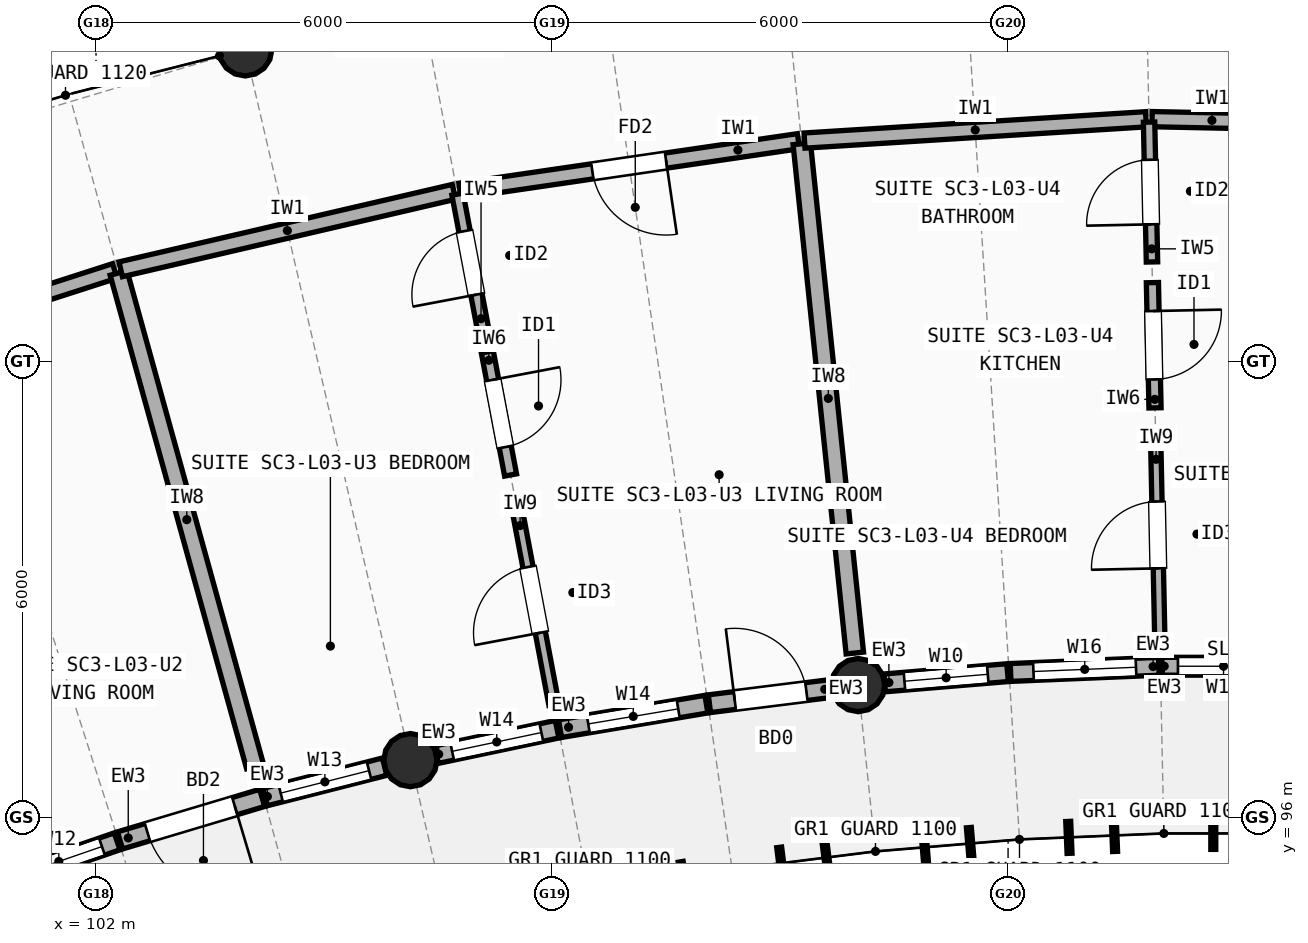
"""IFC4 building model, lengths in metres.
Left out: names, types, materials, properties, quantities, classifications, styles, units other than length and angle.
Written with IfcOpenShell. Run it as: python <this file> out.ifc"""

import sys

from ifc_helpers import new_model, si_unit, direction, frame, frame_2d, origin, origin_2d, place, context, subcontext, project, spatial, rectangle, circle, extrude, element, fill, save


model = new_model("IFC4")
c1 = context("Model", 3, precision=1e-05, world=origin(), true_north=direction((0.0, 1.0)))
c2 = subcontext(c1, "Body", "Model", "MODEL_VIEW")
j1 = project(units=[si_unit("LENGTHUNIT", "METRE"), si_unit("PLANEANGLEUNIT", "RADIAN")], contexts=[c1])
p1 = place(None, origin())
s1 = spatial("IfcSite", under=j1, at=p1, CompositionType="ELEMENT")
p2 = place(p1, origin())
s2 = spatial("IfcBuilding", under=s1, at=p2, CompositionType="ELEMENT")
p3 = place(p2, frame((0.0, 0.0, 10.9)))
s3 = spatial("IfcBuildingStorey", under=s2, at=p3, CompositionType="ELEMENT", Elevation=10.9)
for number, where, z_axis, x_axis in (
    (1, (106.136, 96.754, 0.0), (0.0, 0.0, 1.0), (1.0, 0.0, 0.0)),
    (2, (103.963, 106.105, 0.0), (0.0, 0.0, 1.0), (1.0, 0.0, 0.0)),
    (3, (112.028, 97.742, 0.0), (0.0, 0.0, 1.0), (1.0, 0.0, 0.0)),
):
    element("IfcColumn", number, at=place(p3, frame(where, z_axis=z_axis, x_axis=x_axis)), inside=s3, PredefinedType="COLUMN", context=c2, shape_type="SweptSolid", body=[
        extrude(circle(Radius=0.35, at=origin_2d()), origin(), (0.0, 0.0, 1.0), 2.948),
    ])
p4 = place(p3, frame((100.744, 95.157, 0.0), z_axis=(0.0, 0.0, 1.0), x_axis=(0.945336194352, 0.32609734689, 0.0)))
e4 = element("IfcWall", 4, at=p4, inside=s3, PredefinedType="STANDARD", context=c2, shape_type="SweptSolid", body=[
    extrude(rectangle(XDim=1.622, YDim=0.235, at=frame_2d((0.811, 0.0))), origin(), (0.0, 0.0, 1.0), 2.684),
])
p5 = place(p4, frame((0.211, 0.0, 0.85)))
e5 = element("IfcOpeningElement", 5, at=p5, cuts=e4, PredefinedType="OPENING", context=c2, shape_type="SweptSolid", body=[
    extrude(rectangle(XDim=1.2, YDim=1.35, at=frame_2d((0.6, 0.675))), frame((0.0, 0.127, 0.0), z_axis=(0.0, -1.0, 0.0), x_axis=(1.0, 0.0, 0.0)), (0.0, 0.0, 1.0), 0.255),
])
p6 = place(p3, frame((102.316, 95.698, 0.0), z_axis=(0.0, 0.0, 1.0), x_axis=(0.95807718441, 0.286510224446, 0.0)))
e6 = element("IfcWall", 6, at=p6, inside=s3, PredefinedType="STANDARD", context=c2, shape_type="SweptSolid", body=[
    extrude(rectangle(XDim=1.952, YDim=0.235, at=frame_2d((0.976, 0.0))), origin(), (0.0, 0.0, 1.0), 2.684),
])
p7 = place(p6, frame((0.376, 0.0, 0.0)))
e7 = element("IfcOpeningElement", 7, at=p7, cuts=e6, PredefinedType="OPENING", context=c2, shape_type="SweptSolid", body=[
    extrude(rectangle(XDim=1.2, YDim=2.15, at=frame_2d((0.6, 1.075))), frame((0.0, 0.127, 0.0), z_axis=(0.0, -1.0, 0.0), x_axis=(1.0, 0.0, 0.0)), (0.0, 0.0, 1.0), 0.255),
])
p8 = place(p3, frame((104.225, 96.268, 0.0), z_axis=(0.0, 0.0, 1.0), x_axis=(0.969152085663, 0.246463455413, 0.0)))
e8 = element("IfcWall", 8, at=p8, inside=s3, PredefinedType="STANDARD", context=c2, shape_type="SweptSolid", body=[
    extrude(rectangle(XDim=1.623, YDim=0.235, at=frame_2d((0.811, 0.0))), origin(), (0.0, 0.0, 1.0), 2.684),
])
p9 = place(p8, frame((0.211, 0.0, 0.85)))
e9 = element("IfcOpeningElement", 9, at=p9, cuts=e8, PredefinedType="OPENING", context=c2, shape_type="SweptSolid", body=[
    extrude(rectangle(XDim=1.2, YDim=1.45, at=frame_2d((0.6, 0.725))), frame((0.0, 0.127, 0.0), z_axis=(0.0, -1.0, 0.0), x_axis=(1.0, 0.0, 0.0)), (0.0, 0.0, 1.0), 0.255),
])
p10 = place(p3, frame((106.479, 96.826, 0.0), z_axis=(0.0, 0.0, 1.0), x_axis=(0.978514642092, 0.206177339229, 0.0)))
e10 = element("IfcWall", 10, at=p10, inside=s3, PredefinedType="STANDARD", context=c2, shape_type="SweptSolid", body=[
    extrude(rectangle(XDim=1.622, YDim=0.235, at=frame_2d((0.811, 0.0))), origin(), (0.0, 0.0, 1.0), 2.684),
])
p11 = place(p10, frame((0.211, 0.0, 0.85)))
e11 = element("IfcOpeningElement", 11, at=p11, cuts=e10, PredefinedType="OPENING", context=c2, shape_type="SweptSolid", body=[
    extrude(rectangle(XDim=1.2, YDim=1.5, at=frame_2d((0.6, 0.75))), frame((0.0, 0.127, 0.0), z_axis=(0.0, -1.0, 0.0), x_axis=(1.0, 0.0, 0.0)), (0.0, 0.0, 1.0), 0.255),
])
p12 = place(p3, frame((108.105, 97.168, 0.0), z_axis=(0.0, 0.0, 1.0), x_axis=(0.986241418229, 0.165311418144, 0.0)))
e12 = element("IfcWall", 12, at=p12, inside=s3, PredefinedType="STANDARD", context=c2, shape_type="SweptSolid", body=[
    extrude(rectangle(XDim=1.952, YDim=0.235, at=frame_2d((0.976, 0.0))), origin(), (0.0, 0.0, 1.0), 2.684),
])
p13 = place(p12, frame((0.376, 0.0, 0.85)))
e13 = element("IfcOpeningElement", 13, at=p13, cuts=e12, PredefinedType="OPENING", context=c2, shape_type="SweptSolid", body=[
    extrude(rectangle(XDim=1.2, YDim=1.5, at=frame_2d((0.6, 0.75))), frame((0.0, 0.127, 0.0), z_axis=(0.0, -1.0, 0.0), x_axis=(1.0, 0.0, 0.0)), (0.0, 0.0, 1.0), 0.255),
])
p14 = place(p3, frame((110.071, 97.497, 0.0), z_axis=(0.0, 0.0, 1.0), x_axis=(0.992263980046, 0.124145857376, 0.0)))
e14 = element("IfcWall", 14, at=p14, inside=s3, PredefinedType="STANDARD", context=c2, shape_type="SweptSolid", body=[
    extrude(rectangle(XDim=1.622, YDim=0.235, at=frame_2d((0.811, 0.0))), origin(), (0.0, 0.0, 1.0), 2.684),
])
p15 = place(p14, frame((0.336, 0.0, 0.0)))
e15 = element("IfcOpeningElement", 15, at=p15, cuts=e14, PredefinedType="OPENING", context=c2, shape_type="SweptSolid", body=[
    extrude(rectangle(XDim=0.95, YDim=2.12, at=frame_2d((0.475, 1.06))), frame((0.0, 0.127, 0.0), z_axis=(0.0, -1.0, 0.0), x_axis=(1.0, 0.0, 0.0)), (0.0, 0.0, 1.0), 0.255),
])
p16 = place(p3, frame((112.376, 97.771, 0.0), z_axis=(0.0, 0.0, 1.0), x_axis=(0.996557163732, 0.082908500259, 0.0)))
e16 = element("IfcWall", 16, at=p16, inside=s3, PredefinedType="STANDARD", context=c2, shape_type="SweptSolid", body=[
    extrude(rectangle(XDim=1.623, YDim=0.235, at=frame_2d((0.811, 0.0))), origin(), (0.0, 0.0, 1.0), 2.684),
])
p17 = place(p16, frame((0.261, 0.0, 0.85)))
e17 = element("IfcOpeningElement", 17, at=p17, cuts=e16, PredefinedType="OPENING", context=c2, shape_type="SweptSolid", body=[
    extrude(rectangle(XDim=1.1, YDim=1.45, at=frame_2d((0.55, 0.725))), frame((0.0, 0.127, 0.0), z_axis=(0.0, -1.0, 0.0), x_axis=(1.0, 0.0, 0.0)), (0.0, 0.0, 1.0), 0.255),
])
p18 = place(p3, frame((114.033, 97.908, 0.0), z_axis=(0.0, 0.0, 1.0), x_axis=(0.999132639597, 0.041640947307, 0.0)))
e18 = element("IfcWall", 18, at=p18, inside=s3, PredefinedType="STANDARD", context=c2, shape_type="SweptSolid", body=[
    extrude(rectangle(XDim=1.952, YDim=0.235, at=frame_2d((0.976, 0.0))), origin(), (0.0, 0.0, 1.0), 2.684),
])
p19 = place(p18, frame((0.301, 0.0, 0.85)))
e19 = element("IfcOpeningElement", 19, at=p19, cuts=e18, PredefinedType="OPENING", context=c2, shape_type="SweptSolid", body=[
    extrude(rectangle(XDim=1.35, YDim=1.5, at=frame_2d((0.675, 0.75))), frame((0.0, 0.127, 0.0), z_axis=(0.0, -1.0, 0.0), x_axis=(1.0, 0.0, 0.0)), (0.0, 0.0, 1.0), 0.255),
])
p20 = place(p3, frame((116.024, 97.99, 0.0), z_axis=(0.0, 0.0, 1.0), x_axis=(1.0, 0.0, 0.0)))
e20 = element("IfcWall", 20, at=p20, inside=s3, PredefinedType="STANDARD", context=c2, shape_type="SweptSolid", body=[
    extrude(rectangle(XDim=1.623, YDim=0.235, at=frame_2d((0.811, 0.0))), origin(), (0.0, 0.0, 1.0), 2.684),
])
p21 = place(p20, frame((0.211, 0.0, 0.85)))
e21 = element("IfcOpeningElement", 21, at=p21, cuts=e20, PredefinedType="OPENING", context=c2, shape_type="SweptSolid", body=[
    extrude(rectangle(XDim=1.2, YDim=1.35, at=frame_2d((0.6, 0.675))), frame((0.0, 0.127, 0.0), z_axis=(0.0, -1.0, 0.0), x_axis=(1.0, 0.0, 0.0)), (0.0, 0.0, 1.0), 0.255),
])
p22 = place(p3, frame((97.963, 101.812, 0.0), z_axis=(0.0, 0.0, 1.0), x_axis=(0.95193992138, 0.306284812035, 0.0)))
e22 = element("IfcWall", 22, at=p22, inside=s3, PredefinedType="SOLIDWALL", context=c2, shape_type="SweptSolid", body=[
    extrude(rectangle(XDim=4.501, YDim=0.2, at=frame_2d((2.25, 0.0))), origin(), (0.0, 0.0, 1.0), 2.722),
])
p23 = place(p22, frame((1.751, 0.0, 0.0)))
e23 = element("IfcOpeningElement", 23, at=p23, cuts=e22, PredefinedType="OPENING", context=c2, shape_type="SweptSolid", body=[
    extrude(rectangle(XDim=1.0, YDim=2.15, at=frame_2d((0.5, 1.075))), frame((0.0, 0.11, 0.0), z_axis=(0.0, -1.0, 0.0), x_axis=(1.0, 0.0, 0.0)), (0.0, 0.0, 1.0), 0.22),
])
p24 = place(p3, frame((104.092, 96.672, 0.0), z_axis=(0.0, 0.0, 1.0), x_axis=(-0.266578174631, 0.963813299768, 0.0)))
e24 = element("IfcWall", 24, at=p24, inside=s3, PredefinedType="SOLIDWALL", context=c2, shape_type="SweptSolid", body=[
    extrude(rectangle(XDim=6.736, YDim=0.23, at=frame_2d((3.368, 0.0))), origin(), (0.0, 0.0, 1.0), 2.742),
])
p25 = place(p3, frame((102.325, 103.212, 0.0), z_axis=(0.0, 0.0, 1.0), x_axis=(0.974052809246, 0.226320844821, 0.0)))
e25 = element("IfcWall", 25, at=p25, inside=s3, PredefinedType="SOLIDWALL", context=c2, shape_type="SweptSolid", body=[
    extrude(rectangle(XDim=4.501, YDim=0.2, at=frame_2d((2.251, 0.0))), origin(), (0.0, 0.0, 1.0), 2.762),
])
p26 = place(p3, frame((106.788, 104.246, 0.0), z_axis=(0.0, 0.0, 1.0), x_axis=(0.98946769641, 0.14475385232, 0.0)))
e26 = element("IfcWall", 26, at=p26, inside=s3, PredefinedType="SOLIDWALL", context=c2, shape_type="SweptSolid", body=[
    extrude(rectangle(XDim=4.501, YDim=0.2, at=frame_2d((2.251, 0.0))), origin(), (0.0, 0.0, 1.0), 2.742),
])
p27 = place(p26, frame((1.761, 0.0, 0.0)))
e27 = element("IfcOpeningElement", 27, at=p27, cuts=e26, PredefinedType="OPENING", context=c2, shape_type="SweptSolid", body=[
    extrude(rectangle(XDim=0.98, YDim=2.15, at=frame_2d((0.49, 1.075))), frame((0.0, 0.11, 0.0), z_axis=(0.0, -1.0, 0.0), x_axis=(1.0, 0.0, 0.0)), (0.0, 0.0, 1.0), 0.22),
])
p28 = place(p3, frame((108.025, 97.487, 0.0), z_axis=(0.0, 0.0, 1.0), x_axis=(-0.185725576604, 0.982601653874, 0.0)))
e28 = element("IfcWall", 28, at=p28, inside=s3, PredefinedType="PARTITIONING", context=c2, shape_type="SweptSolid", body=[
    extrude(rectangle(XDim=2.8, YDim=0.135, at=frame_2d((1.4, 0.0))), origin(), (0.0, 0.0, 1.0), 2.722),
])
p29 = place(p28, frame((0.96, 0.0, 0.0)))
e29 = element("IfcOpeningElement", 29, at=p29, cuts=e28, PredefinedType="OPENING", context=c2, shape_type="SweptSolid", body=[
    extrude(rectangle(XDim=0.88, YDim=2.1, at=frame_2d((0.44, 1.05))), frame((0.0, 0.077, 0.0), z_axis=(0.0, -1.0, 0.0), x_axis=(1.0, 0.0, 0.0)), (0.0, 0.0, 1.0), 0.155),
])
p30 = place(p3, frame((107.454, 100.506, 0.0), z_axis=(0.0, 0.0, 1.0), x_axis=(-0.185764109712, 0.98259436979, 0.0)))
e30 = element("IfcWall", 30, at=p30, inside=s3, PredefinedType="PLUMBINGWALL", context=c2, shape_type="SweptSolid", body=[
    extrude(rectangle(XDim=1.648, YDim=0.16, at=frame_2d((0.824, 0.0))), origin(), (0.0, 0.0, 1.0), 2.722),
])
p31 = place(p30, frame((0.374, 0.0, 0.0)))
e31 = element("IfcOpeningElement", 31, at=p31, cuts=e30, PredefinedType="OPENING", context=c2, shape_type="SweptSolid", body=[
    extrude(rectangle(XDim=0.9, YDim=2.1, at=frame_2d((0.45, 1.05))), frame((0.0, 0.09, 0.0), z_axis=(0.0, -1.0, 0.0), x_axis=(1.0, 0.0, 0.0)), (0.0, 0.0, 1.0), 0.18),
])
p32 = place(p3, frame((107.098, 102.392, 0.0), z_axis=(0.0, 0.0, 1.0), x_axis=(-0.185746265255, 0.982597743201, 0.0)))
e32 = element("IfcWall", 32, at=p32, inside=s3, PredefinedType="PARTITIONING", context=c2, shape_type="SweptSolid", body=[
    extrude(rectangle(XDim=1.84, YDim=0.15, at=frame_2d((0.92, 0.0))), origin(), (0.0, 0.0, 1.0), 2.722),
])
p33 = place(p32, frame((0.495, 0.0, 0.0)))
e33 = element("IfcOpeningElement", 33, at=p33, cuts=e32, PredefinedType="OPENING", context=c2, shape_type="SweptSolid", body=[
    extrude(rectangle(XDim=0.85, YDim=2.1, at=frame_2d((0.425, 1.05))), frame((0.0, 0.085, 0.0), z_axis=(0.0, -1.0, 0.0), x_axis=(1.0, 0.0, 0.0)), (0.0, 0.0, 1.0), 0.17),
])
p34 = place(p3, frame((111.984, 98.164, 0.0), z_axis=(0.0, 0.0, 1.0), x_axis=(-0.10362251791, 0.994616696915, 0.0)))
e34 = element("IfcWall", 34, at=p34, inside=s3, PredefinedType="SOLIDWALL", context=c2, shape_type="SweptSolid", body=[
    extrude(rectangle(XDim=6.736, YDim=0.23, at=frame_2d((3.368, 0.0))), origin(), (0.0, 0.0, 1.0), 2.762),
])
p35 = place(p3, frame((111.322, 104.906, 0.0), z_axis=(0.0, 0.0, 1.0), x_axis=(0.998063116084, 0.062209455176, 0.0)))
e35 = element("IfcWall", 35, at=p35, inside=s3, PredefinedType="SOLIDWALL", context=c2, shape_type="SweptSolid", body=[
    extrude(rectangle(XDim=4.501, YDim=0.2, at=frame_2d((2.251, 0.0))), origin(), (0.0, 0.0, 1.0), 2.722),
])
p36 = place(p3, frame((115.894, 105.187, 0.0), z_axis=(0.0, 0.0, 1.0), x_axis=(0.999785356511, -0.020718129879, 0.0)))
e36 = element("IfcWall", 36, at=p36, inside=s3, PredefinedType="SOLIDWALL", context=c2, shape_type="SweptSolid", body=[
    extrude(rectangle(XDim=4.501, YDim=0.2, at=frame_2d((2.251, 0.0))), origin(), (0.0, 0.0, 1.0), 2.762),
])
p37 = place(p36, frame((1.726, 0.0, 0.0)))
e37 = element("IfcOpeningElement", 37, at=p37, cuts=e36, PredefinedType="OPENING", context=c2, shape_type="SweptSolid", body=[
    extrude(rectangle(XDim=1.05, YDim=2.15, at=frame_2d((0.525, 1.075))), frame((0.0, 0.11, 0.0), z_axis=(0.0, -1.0, 0.0), x_axis=(1.0, 0.0, 0.0)), (0.0, 0.0, 1.0), 0.22),
])
p38 = place(p3, frame((115.997, 98.318, 0.0), z_axis=(0.0, 0.0, 1.0), x_axis=(-0.02075255058, 0.999784642633, 0.0)))
e38 = element("IfcWall", 38, at=p38, inside=s3, PredefinedType="PARTITIONING", context=c2, shape_type="SweptSolid", body=[
    extrude(rectangle(XDim=2.8, YDim=0.135, at=frame_2d((1.4, 0.0))), origin(), (0.0, 0.0, 1.0), 2.742),
])
p39 = place(p38, frame((0.96, 0.0, 0.0)))
e39 = element("IfcOpeningElement", 39, at=p39, cuts=e38, PredefinedType="OPENING", context=c2, shape_type="SweptSolid", body=[
    extrude(rectangle(XDim=0.88, YDim=2.1, at=frame_2d((0.44, 1.05))), frame((0.0, 0.077, 0.0), z_axis=(0.0, -1.0, 0.0), x_axis=(1.0, 0.0, 0.0)), (0.0, 0.0, 1.0), 0.155),
])
p40 = place(p3, frame((115.933, 101.389, 0.0), z_axis=(0.0, 0.0, 1.0), x_axis=(-0.020887426075, 0.999781833918, 0.0)))
e40 = element("IfcWall", 40, at=p40, inside=s3, PredefinedType="PLUMBINGWALL", context=c2, shape_type="SweptSolid", body=[
    extrude(rectangle(XDim=1.648, YDim=0.16, at=frame_2d((0.824, 0.0))), origin(), (0.0, 0.0, 1.0), 2.742),
])
p41 = place(p40, frame((0.374, 0.0, 0.0)))
e41 = element("IfcOpeningElement", 41, at=p41, cuts=e40, PredefinedType="OPENING", context=c2, shape_type="SweptSolid", body=[
    extrude(rectangle(XDim=0.9, YDim=2.1, at=frame_2d((0.45, 1.05))), frame((0.0, 0.09, 0.0), z_axis=(0.0, -1.0, 0.0), x_axis=(1.0, 0.0, 0.0)), (0.0, 0.0, 1.0), 0.18),
])
p42 = place(p3, frame((115.893, 103.309, 0.0), z_axis=(0.0, 0.0, 1.0), x_axis=(-0.020698948586, 0.999785753813, 0.0)))
e42 = element("IfcWall", 42, at=p42, inside=s3, PredefinedType="PARTITIONING", context=c2, shape_type="SweptSolid", body=[
    extrude(rectangle(XDim=1.84, YDim=0.15, at=frame_2d((0.92, 0.0))), origin(), (0.0, 0.0, 1.0), 2.742),
])
p43 = place(p42, frame((0.495, 0.0, 0.0)))
e43 = element("IfcOpeningElement", 43, at=p43, cuts=e42, PredefinedType="OPENING", context=c2, shape_type="SweptSolid", body=[
    extrude(rectangle(XDim=0.85, YDim=2.1, at=frame_2d((0.425, 1.05))), frame((0.0, 0.085, 0.0), z_axis=(0.0, -1.0, 0.0), x_axis=(1.0, 0.0, 0.0)), (0.0, 0.0, 1.0), 0.17),
])
p44 = place(p5, origin())
e44 = element("IfcWindow", 44, at=p44, inside=s3, PartitioningType="SINGLE_PANEL", PredefinedType="WINDOW", context=c2, shape_type="SweptSolid", body=[
    extrude(rectangle(XDim=1.2, YDim=1.35, at=frame_2d((0.6, 0.675))), frame((0.0, 0.03, 0.0), z_axis=(0.0, -1.0, 0.0), x_axis=(1.0, 0.0, 0.0)), (0.0, 0.0, 1.0), 0.06),
])
fill(e5, e44)
p45 = place(p7, frame((1.2, 0.0, 0.0), z_axis=(0.0, 0.0, 1.0), x_axis=(-1.0, 0.0, 0.0)))
e45 = element("IfcDoor", 45, at=p45, inside=s3, OperationType="SINGLE_SWING_RIGHT", PredefinedType="DOOR", context=c2, shape_type="SweptSolid", body=[
    extrude(rectangle(XDim=1.2, YDim=2.15, at=frame_2d((0.6, 1.075))), frame((0.0, 0.025, 0.0), z_axis=(0.0, -1.0, 0.0), x_axis=(1.0, 0.0, 0.0)), (0.0, 0.0, 1.0), 0.05),
])
fill(e7, e45)
p46 = place(p9, origin())
e46 = element("IfcWindow", 46, at=p46, inside=s3, PartitioningType="SINGLE_PANEL", PredefinedType="WINDOW", context=c2, shape_type="SweptSolid", body=[
    extrude(rectangle(XDim=1.2, YDim=1.45, at=frame_2d((0.6, 0.725))), frame((0.0, 0.03, 0.0), z_axis=(0.0, -1.0, 0.0), x_axis=(1.0, 0.0, 0.0)), (0.0, 0.0, 1.0), 0.06),
])
fill(e9, e46)
p47 = place(p11, origin())
e47 = element("IfcWindow", 47, at=p47, inside=s3, PartitioningType="SINGLE_PANEL", PredefinedType="WINDOW", context=c2, shape_type="SweptSolid", body=[
    extrude(rectangle(XDim=1.2, YDim=1.5, at=frame_2d((0.6, 0.75))), frame((0.0, 0.03, 0.0), z_axis=(0.0, -1.0, 0.0), x_axis=(1.0, 0.0, 0.0)), (0.0, 0.0, 1.0), 0.06),
])
fill(e11, e47)
p48 = place(p13, origin())
e48 = element("IfcWindow", 48, at=p48, inside=s3, PartitioningType="SINGLE_PANEL", PredefinedType="WINDOW", context=c2, shape_type="SweptSolid", body=[
    extrude(rectangle(XDim=1.2, YDim=1.5, at=frame_2d((0.6, 0.75))), frame((0.0, 0.03, 0.0), z_axis=(0.0, -1.0, 0.0), x_axis=(1.0, 0.0, 0.0)), (0.0, 0.0, 1.0), 0.06),
])
fill(e13, e48)
p49 = place(p15, frame((0.95, 0.0, 0.0), z_axis=(0.0, 0.0, 1.0), x_axis=(-1.0, 0.0, 0.0)))
e49 = element("IfcDoor", 49, at=p49, inside=s3, OperationType="SINGLE_SWING_LEFT", PredefinedType="DOOR", context=c2, shape_type="SweptSolid", body=[
    extrude(rectangle(XDim=0.95, YDim=2.12, at=frame_2d((0.475, 1.06))), frame((0.0, 0.025, 0.0), z_axis=(0.0, -1.0, 0.0), x_axis=(1.0, 0.0, 0.0)), (0.0, 0.0, 1.0), 0.05),
])
fill(e15, e49)
p50 = place(p17, origin())
e50 = element("IfcWindow", 50, at=p50, inside=s3, PartitioningType="SINGLE_PANEL", PredefinedType="WINDOW", context=c2, shape_type="SweptSolid", body=[
    extrude(rectangle(XDim=1.1, YDim=1.45, at=frame_2d((0.55, 0.725))), frame((0.0, 0.03, 0.0), z_axis=(0.0, -1.0, 0.0), x_axis=(1.0, 0.0, 0.0)), (0.0, 0.0, 1.0), 0.06),
])
fill(e17, e50)
p51 = place(p19, origin())
e51 = element("IfcWindow", 51, at=p51, inside=s3, PartitioningType="SINGLE_PANEL", PredefinedType="WINDOW", context=c2, shape_type="SweptSolid", body=[
    extrude(rectangle(XDim=1.35, YDim=1.5, at=frame_2d((0.675, 0.75))), frame((0.0, 0.03, 0.0), z_axis=(0.0, -1.0, 0.0), x_axis=(1.0, 0.0, 0.0)), (0.0, 0.0, 1.0), 0.06),
])
fill(e19, e51)
p52 = place(p21, origin())
e52 = element("IfcWindow", 52, at=p52, inside=s3, PartitioningType="SINGLE_PANEL", PredefinedType="WINDOW", context=c2, shape_type="SweptSolid", body=[
    extrude(rectangle(XDim=1.2, YDim=1.35, at=frame_2d((0.6, 0.675))), frame((0.0, 0.03, 0.0), z_axis=(0.0, -1.0, 0.0), x_axis=(1.0, 0.0, 0.0)), (0.0, 0.0, 1.0), 0.06),
])
fill(e21, e52)
p53 = place(p27, origin())
e53 = element("IfcDoor", 53, at=p53, inside=s3, OperationType="SINGLE_SWING_RIGHT", PredefinedType="DOOR", context=c2, shape_type="SweptSolid", body=[
    extrude(rectangle(XDim=0.98, YDim=2.15, at=frame_2d((0.49, 1.075))), frame((0.0, 0.025, 0.0), z_axis=(0.0, -1.0, 0.0), x_axis=(1.0, 0.0, 0.0)), (0.0, 0.0, 1.0), 0.05),
])
fill(e27, e53)
p54 = place(p29, origin())
e54 = element("IfcDoor", 54, at=p54, inside=s3, OperationType="SINGLE_SWING_LEFT", PredefinedType="DOOR", context=c2, shape_type="SweptSolid", body=[
    extrude(rectangle(XDim=0.88, YDim=2.1, at=frame_2d((0.44, 1.05))), frame((0.0, 0.025, 0.0), z_axis=(0.0, -1.0, 0.0), x_axis=(1.0, 0.0, 0.0)), (0.0, 0.0, 1.0), 0.05),
])
fill(e29, e54)
p55 = place(p31, origin())
e55 = element("IfcDoor", 55, at=p55, inside=s3, OperationType="SINGLE_SWING_RIGHT", PredefinedType="DOOR", context=c2, shape_type="SweptSolid", body=[
    extrude(rectangle(XDim=0.9, YDim=2.1, at=frame_2d((0.45, 1.05))), frame((0.0, 0.025, 0.0), z_axis=(0.0, -1.0, 0.0), x_axis=(1.0, 0.0, 0.0)), (0.0, 0.0, 1.0), 0.05),
])
fill(e31, e55)
p56 = place(p33, origin())
e56 = element("IfcDoor", 56, at=p56, inside=s3, OperationType="SINGLE_SWING_LEFT", PredefinedType="DOOR", context=c2, shape_type="SweptSolid", body=[
    extrude(rectangle(XDim=0.85, YDim=2.1, at=frame_2d((0.425, 1.05))), frame((0.0, 0.025, 0.0), z_axis=(0.0, -1.0, 0.0), x_axis=(1.0, 0.0, 0.0)), (0.0, 0.0, 1.0), 0.05),
])
fill(e33, e56)
p57 = place(p39, origin())
e57 = element("IfcDoor", 57, at=p57, inside=s3, OperationType="SINGLE_SWING_LEFT", PredefinedType="DOOR", context=c2, shape_type="SweptSolid", body=[
    extrude(rectangle(XDim=0.88, YDim=2.1, at=frame_2d((0.44, 1.05))), frame((0.0, 0.025, 0.0), z_axis=(0.0, -1.0, 0.0), x_axis=(1.0, 0.0, 0.0)), (0.0, 0.0, 1.0), 0.05),
])
fill(e39, e57)
p58 = place(p41, origin())
e58 = element("IfcDoor", 58, at=p58, inside=s3, OperationType="SINGLE_SWING_RIGHT", PredefinedType="DOOR", context=c2, shape_type="SweptSolid", body=[
    extrude(rectangle(XDim=0.9, YDim=2.1, at=frame_2d((0.45, 1.05))), frame((0.0, 0.025, 0.0), z_axis=(0.0, -1.0, 0.0), x_axis=(1.0, 0.0, 0.0)), (0.0, 0.0, 1.0), 0.05),
])
fill(e41, e58)
p59 = place(p43, origin())
e59 = element("IfcDoor", 59, at=p59, inside=s3, OperationType="SINGLE_SWING_LEFT", PredefinedType="DOOR", context=c2, shape_type="SweptSolid", body=[
    extrude(rectangle(XDim=0.85, YDim=2.1, at=frame_2d((0.425, 1.05))), frame((0.0, 0.025, 0.0), z_axis=(0.0, -1.0, 0.0), x_axis=(1.0, 0.0, 0.0)), (0.0, 0.0, 1.0), 0.05),
])
fill(e43, e59)
save(model, sys.argv[1])
